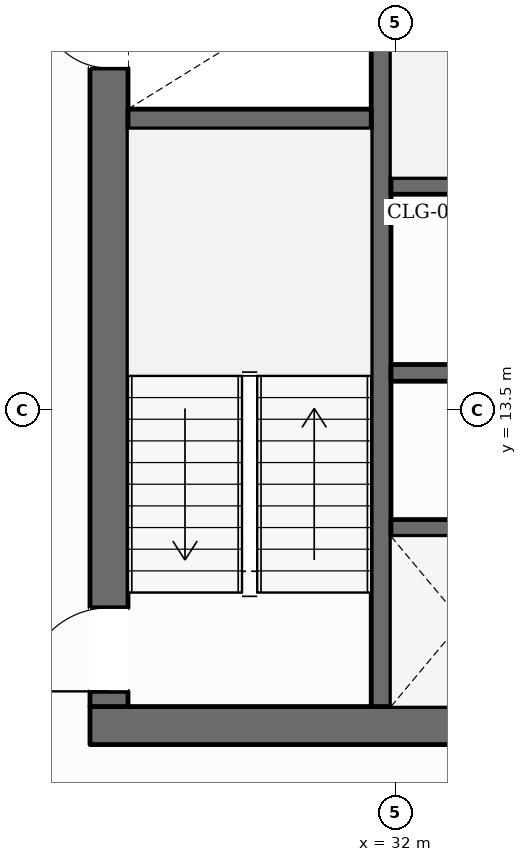
"""IFC4 building model, lengths in metres.
Left out: names, types, materials, properties, quantities, classifications, styles, units other than length and angle.
Written with IfcOpenShell. Run it as: python <this file> out.ifc"""

import sys

from ifc_helpers import new_model, si_unit, direction, frame, frame_2d, origin, place, context, subcontext, project, spatial, rectangle, extrude, element, fill, save


model = new_model("IFC4")
c1 = context("Model", 3, precision=1e-05, world=origin(), true_north=direction((0.0, 1.0)))
c2 = subcontext(c1, "Body", "Model", "MODEL_VIEW")
j1 = project(units=[si_unit("LENGTHUNIT", "METRE"), si_unit("PLANEANGLEUNIT", "RADIAN")], contexts=[c1])
p1 = place(None, origin())
s1 = spatial("IfcSite", under=j1, at=p1, CompositionType="ELEMENT")
p2 = place(p1, origin())
s2 = spatial("IfcBuilding", under=s1, at=p2, CompositionType="ELEMENT")
p3 = place(p2, frame((0.0, 0.0, 108.6)))
s3 = spatial("IfcBuildingStorey", under=s2, at=p3, CompositionType="ELEMENT", Elevation=108.6)
p4 = place(p3, frame((27.98, 9.35, 0.0), z_axis=(0.0, 0.0, 1.0), x_axis=(1.0, 0.0, 0.0)))
e1 = element("IfcWall", 1, at=p4, inside=s3, PredefinedType="SOLIDWALL", context=c2, shape_type="SweptSolid", body=[
    extrude(rectangle(XDim=20.04, YDim=0.5, at=frame_2d((10.02, 0.0))), origin(), (0.0, 0.0, 1.0), 3.6),
])
p5 = place(p4, frame((10.52, 0.0, 0.0)))
e2 = element("IfcOpeningElement", 2, at=p5, cuts=e1, PredefinedType="OPENING", context=c2, shape_type="SweptSolid", body=[
    extrude(rectangle(XDim=1.4, YDim=2.2, at=frame_2d((0.7, 1.1))), frame((0.0, 0.26, 0.0), z_axis=(0.0, -1.0, 0.0), x_axis=(1.0, 0.0, 0.0)), (0.0, 0.0, 1.0), 0.52),
])
p6 = place(p3, frame((28.23, 9.6, 0.0), z_axis=(0.0, 0.0, 1.0), x_axis=(0.0, 1.0, 0.0)))
e3 = element("IfcWall", 3, at=p6, inside=s3, PredefinedType="SOLIDWALL", context=c2, shape_type="SweptSolid", body=[
    extrude(rectangle(XDim=13.0, YDim=0.5, at=frame_2d((6.5, 0.0))), origin(), (0.0, 0.0, 1.0), 3.6),
])
p7 = place(p6, frame((0.2, 0.0, 0.0)))
e4 = element("IfcOpeningElement", 4, at=p7, cuts=e3, PredefinedType="OPENING", context=c2, shape_type="SweptSolid", body=[
    extrude(rectangle(XDim=1.1, YDim=2.15, at=frame_2d((0.55, 1.075))), frame((0.0, 0.26, 0.0), z_axis=(0.0, -1.0, 0.0), x_axis=(1.0, 0.0, 0.0)), (0.0, 0.0, 1.0), 0.52),
])
p8 = place(p6, frame((8.4, 0.0, 0.0)))
e5 = element("IfcOpeningElement", 5, at=p8, cuts=e3, PredefinedType="OPENING", context=c2, shape_type="SweptSolid", body=[
    extrude(rectangle(XDim=0.9, YDim=2.1, at=frame_2d((0.45, 1.05))), frame((0.0, 0.26, 0.0), z_axis=(0.0, -1.0, 0.0), x_axis=(1.0, 0.0, 0.0)), (0.0, 0.0, 1.0), 0.52),
])
p9 = place(p3, frame((31.81, 9.6, 0.0), z_axis=(0.0, 0.0, 1.0), x_axis=(0.0, 1.0, 0.0)))
e6 = element("IfcWall", 6, at=p9, inside=s3, PredefinedType="SHEAR", context=c2, shape_type="SweptSolid", body=[
    extrude(rectangle(XDim=13.0, YDim=0.26, at=frame_2d((6.5, 0.0))), origin(), (0.0, 0.0, 1.0), 3.6),
])
p10 = place(p9, frame((10.925, 0.0, 0.0)))
e7 = element("IfcOpeningElement", 7, at=p10, cuts=e6, PredefinedType="OPENING", context=c2, shape_type="SweptSolid", body=[
    extrude(rectangle(XDim=1.25, YDim=2.25, at=frame_2d((0.625, 1.125))), frame((0.0, 0.14, 0.0), z_axis=(0.0, -1.0, 0.0), x_axis=(1.0, 0.0, 0.0)), (0.0, 0.0, 1.0), 0.28),
])
p11 = place(p3, frame((28.48, 17.33, 0.0), z_axis=(0.0, 0.0, 1.0), x_axis=(1.0, 0.0, 0.0)))
e8 = element("IfcWall", 8, at=p11, inside=s3, PredefinedType="SHEAR", context=c2, shape_type="SweptSolid", body=[
    extrude(rectangle(XDim=3.2, YDim=0.26, at=frame_2d((1.6, 0.0))), origin(), (0.0, 0.0, 1.0), 3.6),
])
p12 = place(p3, frame((31.94, 16.45, 0.0), z_axis=(0.0, 0.0, 1.0), x_axis=(1.0, 0.0, 0.0)))
e9 = element("IfcWall", 9, at=p12, inside=s3, PredefinedType="SOLIDWALL", context=c2, shape_type="SweptSolid", body=[
    extrude(rectangle(XDim=12.12, YDim=0.22, at=frame_2d((6.06, 0.0))), origin(), (0.0, 0.0, 1.0), 3.6),
])
p13 = place(p3, frame((31.94, 13.99, 0.0), z_axis=(0.0, 0.0, 1.0), x_axis=(1.0, 0.0, 0.0)))
e10 = element("IfcWall", 10, at=p13, inside=s3, PredefinedType="SOLIDWALL", context=c2, shape_type="SweptSolid", body=[
    extrude(rectangle(XDim=12.12, YDim=0.22, at=frame_2d((6.06, 0.0))), origin(), (0.0, 0.0, 1.0), 3.6),
])
p14 = place(p13, frame((1.21, 0.0, 0.0)))
e11 = element("IfcOpeningElement", 11, at=p14, cuts=e10, PredefinedType="OPENING", context=c2, shape_type="SweptSolid", body=[
    extrude(rectangle(XDim=0.9, YDim=2.1, at=frame_2d((0.45, 1.05))), frame((0.0, 0.12, 0.0), z_axis=(0.0, -1.0, 0.0), x_axis=(1.0, 0.0, 0.0)), (0.0, 0.0, 1.0), 0.24),
])
p15 = place(p13, frame((4.31, 0.0, 0.0)))
e12 = element("IfcOpeningElement", 12, at=p15, cuts=e10, PredefinedType="OPENING", context=c2, shape_type="SweptSolid", body=[
    extrude(rectangle(XDim=0.9, YDim=2.1, at=frame_2d((0.45, 1.05))), frame((0.0, 0.12, 0.0), z_axis=(0.0, -1.0, 0.0), x_axis=(1.0, 0.0, 0.0)), (0.0, 0.0, 1.0), 0.24),
])
p16 = place(p13, frame((6.535, 0.0, 0.0)))
e13 = element("IfcOpeningElement", 13, at=p16, cuts=e10, PredefinedType="OPENING", context=c2, shape_type="SweptSolid", body=[
    extrude(rectangle(XDim=1.1, YDim=2.2, at=frame_2d((0.55, 1.1))), frame((0.0, 0.12, 0.0), z_axis=(0.0, -1.0, 0.0), x_axis=(1.0, 0.0, 0.0)), (0.0, 0.0, 1.0), 0.24),
])
p17 = place(p13, frame((8.585, 0.0, 0.0)))
e14 = element("IfcOpeningElement", 14, at=p17, cuts=e10, PredefinedType="OPENING", context=c2, shape_type="SweptSolid", body=[
    extrude(rectangle(XDim=1.1, YDim=2.2, at=frame_2d((0.55, 1.1))), frame((0.0, 0.12, 0.0), z_axis=(0.0, -1.0, 0.0), x_axis=(1.0, 0.0, 0.0)), (0.0, 0.0, 1.0), 0.24),
])
p18 = place(p13, frame((10.635, 0.0, 0.0)))
e15 = element("IfcOpeningElement", 15, at=p18, cuts=e10, PredefinedType="OPENING", context=c2, shape_type="SweptSolid", body=[
    extrude(rectangle(XDim=1.1, YDim=2.2, at=frame_2d((0.55, 1.1))), frame((0.0, 0.12, 0.0), z_axis=(0.0, -1.0, 0.0), x_axis=(1.0, 0.0, 0.0)), (0.0, 0.0, 1.0), 0.24),
])
p19 = place(p3, frame((31.94, 11.95, 0.0), z_axis=(0.0, 0.0, 1.0), x_axis=(1.0, 0.0, 0.0)))
e16 = element("IfcWall", 16, at=p19, inside=s3, PredefinedType="SOLIDWALL", context=c2, shape_type="SweptSolid", body=[
    extrude(rectangle(XDim=6.19, YDim=0.22, at=frame_2d((3.095, 0.0))), origin(), (0.0, 0.0, 1.0), 3.6),
])
p20 = place(p3, frame((14.155, 13.347, 0.0), z_axis=(0.0, 0.0, 1.0), x_axis=(0.493868426836, 0.869536644986, 0.0)))
e17 = element("IfcWall", 17, at=p20, inside=s3, PredefinedType="STANDARD", context=c2, shape_type="SweptSolid", body=[
    extrude(rectangle(XDim=36.121, YDim=0.38, at=frame_2d((18.061, 0.0))), origin(), (0.0, 0.0, 1.0), 3.059),
])
p21 = place(p20, frame((31.935, 0.0, 0.65)))
e18 = element("IfcOpeningElement", 18, at=p21, cuts=e17, PredefinedType="OPENING", context=c2, shape_type="SweptSolid", body=[
    extrude(rectangle(XDim=1.55, YDim=1.75, at=frame_2d((0.775, 0.875))), frame((0.0, 0.2, 0.0), z_axis=(0.0, -1.0, 0.0), x_axis=(1.0, 0.0, 0.0)), (0.0, 0.0, 1.0), 0.4),
])
p22 = place(p20, frame((26.073, 0.0, 0.65)))
e19 = element("IfcOpeningElement", 19, at=p22, cuts=e17, PredefinedType="OPENING", context=c2, shape_type="SweptSolid", body=[
    extrude(rectangle(XDim=1.55, YDim=1.75, at=frame_2d((0.775, 0.875))), frame((0.0, 0.2, 0.0), z_axis=(0.0, -1.0, 0.0), x_axis=(1.0, 0.0, 0.0)), (0.0, 0.0, 1.0), 0.4),
])
p23 = place(p20, frame((14.352, 0.0, 0.65)))
e20 = element("IfcOpeningElement", 20, at=p23, cuts=e17, PredefinedType="OPENING", context=c2, shape_type="SweptSolid", body=[
    extrude(rectangle(XDim=1.55, YDim=1.75, at=frame_2d((0.775, 0.875))), frame((0.0, 0.2, 0.0), z_axis=(0.0, -1.0, 0.0), x_axis=(1.0, 0.0, 0.0)), (0.0, 0.0, 1.0), 0.4),
])
p24 = place(p20, frame((8.491, 0.0, 0.65)))
e21 = element("IfcOpeningElement", 21, at=p24, cuts=e17, PredefinedType="OPENING", context=c2, shape_type="SweptSolid", body=[
    extrude(rectangle(XDim=1.55, YDim=1.75, at=frame_2d((0.775, 0.875))), frame((0.0, 0.2, 0.0), z_axis=(0.0, -1.0, 0.0), x_axis=(1.0, 0.0, 0.0)), (0.0, 0.0, 1.0), 0.4),
])
p25 = place(p20, frame((2.63, 0.0, 0.65)))
e22 = element("IfcOpeningElement", 22, at=p25, cuts=e17, PredefinedType="OPENING", context=c2, shape_type="SweptSolid", body=[
    extrude(rectangle(XDim=1.55, YDim=1.75, at=frame_2d((0.775, 0.875))), frame((0.0, 0.2, 0.0), z_axis=(0.0, -1.0, 0.0), x_axis=(1.0, 0.0, 0.0)), (0.0, 0.0, 1.0), 0.4),
])
p26 = place(p7, origin())
e23 = element("IfcDoor", 23, at=p26, inside=s3, OperationType="SINGLE_SWING_LEFT", PredefinedType="DOOR", context=c2, shape_type="SweptSolid", body=[
    extrude(rectangle(XDim=1.1, YDim=2.15, at=frame_2d((0.55, 1.075))), frame((0.0, 0.025, 0.0), z_axis=(0.0, -1.0, 0.0), x_axis=(1.0, 0.0, 0.0)), (0.0, 0.0, 1.0), 0.05),
])
fill(e4, e23)
p27 = place(p8, origin())
e24 = element("IfcDoor", 24, at=p27, inside=s3, OperationType="SINGLE_SWING_RIGHT", PredefinedType="DOOR", context=c2, shape_type="SweptSolid", body=[
    extrude(rectangle(XDim=0.9, YDim=2.1, at=frame_2d((0.45, 1.05))), frame((0.0, 0.025, 0.0), z_axis=(0.0, -1.0, 0.0), x_axis=(1.0, 0.0, 0.0)), (0.0, 0.0, 1.0), 0.05),
])
fill(e5, e24)
save(model, sys.argv[1])
